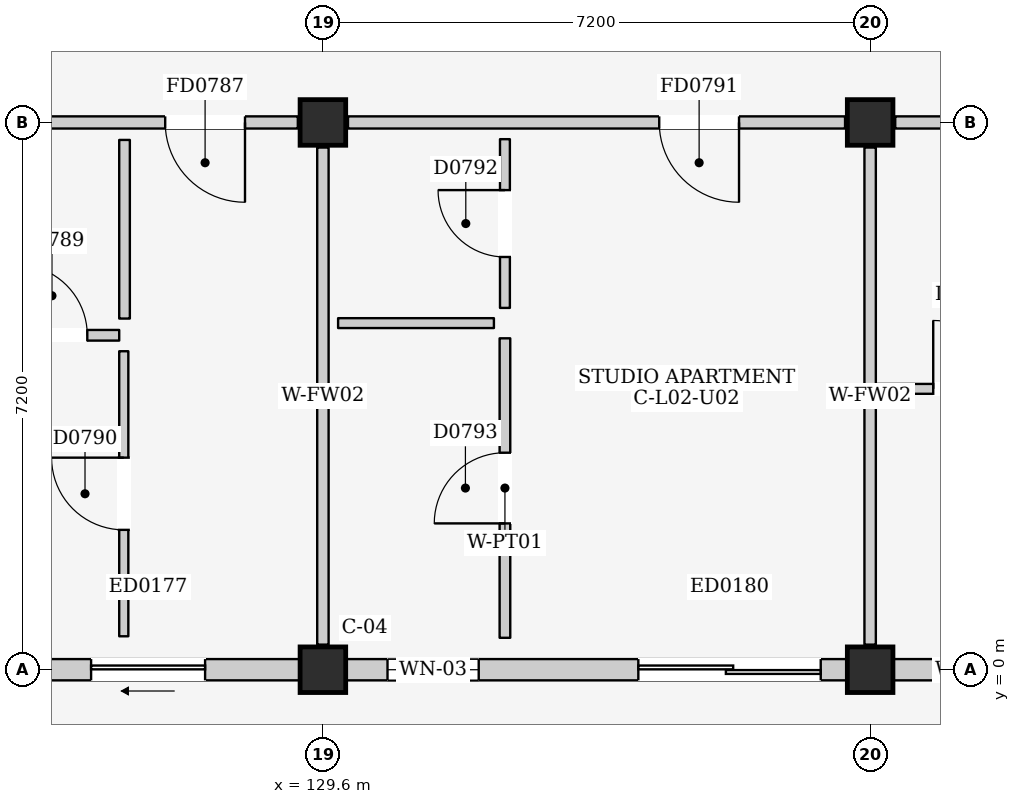
"""IFC4 building model, lengths in metres.
Left out: names, types, materials, properties, quantities, classifications, styles, units other than length and angle.
Written with IfcOpenShell. Run it as: python <this file> out.ifc"""

import sys

from ifc_helpers import new_model, si_unit, direction, frame, frame_2d, origin, origin_2d, place, context, subcontext, project, spatial, rectangle, extrude, element, fill, save


model = new_model("IFC4")
c1 = context("Model", 3, precision=1e-05, world=origin(), true_north=direction((0.0, 1.0)))
c2 = subcontext(c1, "Body", "Model", "MODEL_VIEW")
j1 = project(units=[si_unit("LENGTHUNIT", "METRE"), si_unit("PLANEANGLEUNIT", "RADIAN")], contexts=[c1])
p1 = place(None, origin())
s1 = spatial("IfcSite", under=j1, at=p1, CompositionType="ELEMENT")
p2 = place(p1, origin())
s2 = spatial("IfcBuilding", under=s1, at=p2, CompositionType="ELEMENT")
p3 = place(p2, frame((0.0, 0.0, 9.0)))
s3 = spatial("IfcBuildingStorey", under=s2, at=p3, CompositionType="ELEMENT", Elevation=9.0)
for number, where, z_axis, x_axis in (
    (1, (129.6, 0.0, 0.0), (0.0, 0.0, 1.0), (1.0, 0.0, 0.0)),
    (2, (129.6, 7.2, 0.0), (0.0, 0.0, 1.0), (1.0, 0.0, 0.0)),
    (3, (136.8, 0.0, 0.0), (0.0, 0.0, 1.0), (1.0, 0.0, 0.0)),
    (4, (136.8, 7.2, 0.0), (0.0, 0.0, 1.0), (1.0, 0.0, 0.0)),
):
    element("IfcColumn", number, at=place(p3, frame(where, z_axis=z_axis, x_axis=x_axis)), inside=s3, PredefinedType="COLUMN", context=c2, shape_type="SweptSolid", body=[
        extrude(rectangle(XDim=0.6, YDim=0.6, at=origin_2d()), origin(), (0.0, 0.0, 1.0), 3.2),
    ])
p4 = place(p3, frame((122.7, 0.0, 0.0), z_axis=(0.0, 0.0, 1.0), x_axis=(1.0, 0.0, 0.0)))
e5 = element("IfcWall", 5, at=p4, inside=s3, PredefinedType="ELEMENTEDWALL", context=c2, shape_type="SweptSolid", body=[
    extrude(rectangle(XDim=6.6, YDim=0.28, at=frame_2d((3.3, 0.0))), origin(), (0.0, 0.0, 1.0), 2.425),
])
p5 = place(p4, frame((3.85, 0.0, 0.0)))
e6 = element("IfcOpeningElement", 6, at=p5, cuts=e5, PredefinedType="OPENING", context=c2, shape_type="SweptSolid", body=[
    extrude(rectangle(XDim=1.5, YDim=2.12, at=frame_2d((0.75, 1.06))), frame((0.0, 0.155, 0.0), z_axis=(0.0, -1.0, 0.0), x_axis=(1.0, 0.0, 0.0)), (0.0, 0.0, 1.0), 0.31),
])
p6 = place(p4, frame((0.55, 0.0, 0.815)))
e7 = element("IfcOpeningElement", 7, at=p6, cuts=e5, PredefinedType="OPENING", context=c2, shape_type="SweptSolid", body=[
    extrude(rectangle(XDim=1.5, YDim=1.5, at=frame_2d((0.75, 0.75))), frame((0.0, 0.155, 0.0), z_axis=(0.0, -1.0, 0.0), x_axis=(1.0, 0.0, 0.0)), (0.0, 0.0, 1.0), 0.31),
])
p7 = place(p3, frame((129.9, 0.0, 0.0), z_axis=(0.0, 0.0, 1.0), x_axis=(1.0, 0.0, 0.0)))
e8 = element("IfcWall", 8, at=p7, inside=s3, PredefinedType="ELEMENTEDWALL", context=c2, shape_type="SweptSolid", body=[
    extrude(rectangle(XDim=6.6, YDim=0.28, at=frame_2d((3.3, 0.0))), origin(), (0.0, 0.0, 1.0), 2.425),
])
p8 = place(p7, frame((3.85, 0.0, 0.0)))
e9 = element("IfcOpeningElement", 9, at=p8, cuts=e8, PredefinedType="OPENING", context=c2, shape_type="SweptSolid", body=[
    extrude(rectangle(XDim=2.4, YDim=2.12, at=frame_2d((1.2, 1.06))), frame((0.0, 0.155, 0.0), z_axis=(0.0, -1.0, 0.0), x_axis=(1.0, 0.0, 0.0)), (0.0, 0.0, 1.0), 0.31),
])
p9 = place(p7, frame((0.55, 0.0, 0.9)))
e10 = element("IfcOpeningElement", 10, at=p9, cuts=e8, PredefinedType="OPENING", context=c2, shape_type="SweptSolid", body=[
    extrude(rectangle(XDim=1.2, YDim=1.35, at=frame_2d((0.6, 0.675))), frame((0.0, 0.155, 0.0), z_axis=(0.0, -1.0, 0.0), x_axis=(1.0, 0.0, 0.0)), (0.0, 0.0, 1.0), 0.31),
])
p10 = place(p3, frame((137.1, 0.0, 0.0), z_axis=(0.0, 0.0, 1.0), x_axis=(1.0, 0.0, 0.0)))
e11 = element("IfcWall", 11, at=p10, inside=s3, PredefinedType="ELEMENTEDWALL", context=c2, shape_type="SweptSolid", body=[
    extrude(rectangle(XDim=6.6, YDim=0.28, at=frame_2d((3.3, 0.0))), origin(), (0.0, 0.0, 1.0), 2.425),
])
p11 = place(p10, frame((3.85, 0.0, 0.0)))
e12 = element("IfcOpeningElement", 12, at=p11, cuts=e11, PredefinedType="OPENING", context=c2, shape_type="SweptSolid", body=[
    extrude(rectangle(XDim=2.0, YDim=2.12, at=frame_2d((1.0, 1.06))), frame((0.0, 0.155, 0.0), z_axis=(0.0, -1.0, 0.0), x_axis=(1.0, 0.0, 0.0)), (0.0, 0.0, 1.0), 0.31),
])
p12 = place(p10, frame((0.55, 0.0, 0.9)))
e13 = element("IfcOpeningElement", 13, at=p12, cuts=e11, PredefinedType="OPENING", context=c2, shape_type="SweptSolid", body=[
    extrude(rectangle(XDim=0.9, YDim=1.1, at=frame_2d((0.45, 0.55))), frame((0.0, 0.155, 0.0), z_axis=(0.0, -1.0, 0.0), x_axis=(1.0, 0.0, 0.0)), (0.0, 0.0, 1.0), 0.31),
])
p13 = place(p3, frame((122.73, 7.2, 0.0), z_axis=(0.0, 0.0, 1.0), x_axis=(1.0, 0.0, 0.0)))
e14 = element("IfcWall", 14, at=p13, inside=s3, PredefinedType="PARTITIONING", context=c2, shape_type="SweptSolid", body=[
    extrude(rectangle(XDim=6.54, YDim=0.16, at=frame_2d((3.27, 0.0))), origin(), (0.0, 0.0, 1.0), 2.345),
])
p14 = place(p13, frame((4.795, 0.0, 0.0)))
e15 = element("IfcOpeningElement", 15, at=p14, cuts=e14, PredefinedType="OPENING", context=c2, shape_type="SweptSolid", body=[
    extrude(rectangle(XDim=1.05, YDim=2.15, at=frame_2d((0.525, 1.075))), frame((0.0, 0.095, 0.0), z_axis=(0.0, -1.0, 0.0), x_axis=(1.0, 0.0, 0.0)), (0.0, 0.0, 1.0), 0.19),
])
p15 = place(p3, frame((129.6, 0.33, 0.0), z_axis=(0.0, 0.0, 1.0), x_axis=(0.0, 1.0, 0.0)))
e16 = element("IfcWall", 16, at=p15, inside=s3, PredefinedType="PARTITIONING", context=c2, shape_type="SweptSolid", body=[
    extrude(rectangle(XDim=6.54, YDim=0.15, at=frame_2d((3.27, 0.0))), origin(), (0.0, 0.0, 1.0), 2.395),
])
p16 = place(p3, frame((125.15, 4.4, 0.0), z_axis=(0.0, 0.0, 1.0), x_axis=(1.0, 0.0, 0.0)))
e17 = element("IfcWall", 17, at=p16, inside=s3, PredefinedType="PARTITIONING", context=c2, shape_type="SweptSolid", body=[
    extrude(rectangle(XDim=1.77, YDim=0.14, at=frame_2d((0.885, 0.0))), origin(), (0.0, 0.0, 1.0), 2.96),
])
p17 = place(p16, frame((0.42, 0.0, 0.0)))
e18 = element("IfcOpeningElement", 18, at=p17, cuts=e17, PredefinedType="OPENING", context=c2, shape_type="SweptSolid", body=[
    extrude(rectangle(XDim=0.93, YDim=2.14, at=frame_2d((0.465, 1.07))), frame((0.0, 0.085, 0.0), z_axis=(0.0, -1.0, 0.0), x_axis=(1.0, 0.0, 0.0)), (0.0, 0.0, 1.0), 0.17),
])
p18 = place(p3, frame((126.99, 4.62, 0.0), z_axis=(0.0, 0.0, 1.0), x_axis=(0.0, 1.0, 0.0)))
e19 = element("IfcWall", 19, at=p18, inside=s3, PredefinedType="PARTITIONING", context=c2, shape_type="SweptSolid", body=[
    extrude(rectangle(XDim=2.35, YDim=0.14, at=frame_2d((1.175, 0.0))), origin(), (0.0, 0.0, 1.0), 2.96),
])
p19 = place(p3, frame((126.98, 0.44, 0.0), z_axis=(0.0, 0.0, 1.0), x_axis=(0.0, 1.0, 0.0)))
e20 = element("IfcWall", 20, at=p19, inside=s3, PredefinedType="PARTITIONING", context=c2, shape_type="SweptSolid", body=[
    extrude(rectangle(XDim=3.75, YDim=0.12, at=frame_2d((1.875, 0.0))), origin(), (0.0, 0.0, 1.0), 2.96),
])
p20 = place(p19, frame((1.4, 0.0, 0.0)))
e21 = element("IfcOpeningElement", 21, at=p20, cuts=e20, PredefinedType="OPENING", context=c2, shape_type="SweptSolid", body=[
    extrude(rectangle(XDim=0.95, YDim=2.15, at=frame_2d((0.475, 1.075))), frame((0.0, 0.075, 0.0), z_axis=(0.0, -1.0, 0.0), x_axis=(1.0, 0.0, 0.0)), (0.0, 0.0, 1.0), 0.15),
])
p21 = place(p3, frame((129.93, 7.2, 0.0), z_axis=(0.0, 0.0, 1.0), x_axis=(1.0, 0.0, 0.0)))
e22 = element("IfcWall", 22, at=p21, inside=s3, PredefinedType="PARTITIONING", context=c2, shape_type="SweptSolid", body=[
    extrude(rectangle(XDim=6.54, YDim=0.16, at=frame_2d((3.27, 0.0))), origin(), (0.0, 0.0, 1.0), 2.345),
])
p22 = place(p21, frame((4.095, 0.0, 0.0)))
e23 = element("IfcOpeningElement", 23, at=p22, cuts=e22, PredefinedType="OPENING", context=c2, shape_type="SweptSolid", body=[
    extrude(rectangle(XDim=1.05, YDim=2.15, at=frame_2d((0.525, 1.075))), frame((0.0, 0.095, 0.0), z_axis=(0.0, -1.0, 0.0), x_axis=(1.0, 0.0, 0.0)), (0.0, 0.0, 1.0), 0.19),
])
p23 = place(p3, frame((136.8, 0.33, 0.0), z_axis=(0.0, 0.0, 1.0), x_axis=(0.0, 1.0, 0.0)))
e24 = element("IfcWall", 24, at=p23, inside=s3, PredefinedType="PARTITIONING", context=c2, shape_type="SweptSolid", body=[
    extrude(rectangle(XDim=6.54, YDim=0.15, at=frame_2d((3.27, 0.0))), origin(), (0.0, 0.0, 1.0), 2.395),
])
p24 = place(p3, frame((129.8, 4.56, 0.0), z_axis=(0.0, 0.0, 1.0), x_axis=(1.0, 0.0, 0.0)))
e25 = element("IfcWall", 25, at=p24, inside=s3, PredefinedType="PARTITIONING", context=c2, shape_type="SweptSolid", body=[
    extrude(rectangle(XDim=2.05, YDim=0.13, at=frame_2d((1.025, 0.0))), origin(), (0.0, 0.0, 1.0), 2.96),
])
p25 = place(p3, frame((131.995, 4.76, 0.0), z_axis=(0.0, 0.0, 1.0), x_axis=(0.0, 1.0, 0.0)))
e26 = element("IfcWall", 26, at=p25, inside=s3, PredefinedType="PARTITIONING", context=c2, shape_type="SweptSolid", body=[
    extrude(rectangle(XDim=2.22, YDim=0.13, at=frame_2d((1.11, 0.0))), origin(), (0.0, 0.0, 1.0), 2.96),
])
p26 = place(p25, frame((0.67, 0.0, 0.0)))
e27 = element("IfcOpeningElement", 27, at=p26, cuts=e26, PredefinedType="OPENING", context=c2, shape_type="SweptSolid", body=[
    extrude(rectangle(XDim=0.88, YDim=2.1, at=frame_2d((0.44, 1.05))), frame((0.0, 0.08, 0.0), z_axis=(0.0, -1.0, 0.0), x_axis=(1.0, 0.0, 0.0)), (0.0, 0.0, 1.0), 0.16),
])
p27 = place(p3, frame((131.995, 0.42, 0.0), z_axis=(0.0, 0.0, 1.0), x_axis=(0.0, 1.0, 0.0)))
e28 = element("IfcWall", 28, at=p27, inside=s3, PredefinedType="PARTITIONING", context=c2, shape_type="SweptSolid", body=[
    extrude(rectangle(XDim=3.94, YDim=0.14, at=frame_2d((1.97, 0.0))), origin(), (0.0, 0.0, 1.0), 2.96),
])
p28 = place(p27, frame((1.505, 0.0, 0.0)))
e29 = element("IfcOpeningElement", 29, at=p28, cuts=e28, PredefinedType="OPENING", context=c2, shape_type="SweptSolid", body=[
    extrude(rectangle(XDim=0.93, YDim=2.14, at=frame_2d((0.465, 1.07))), frame((0.0, 0.085, 0.0), z_axis=(0.0, -1.0, 0.0), x_axis=(1.0, 0.0, 0.0)), (0.0, 0.0, 1.0), 0.17),
])
p29 = place(p3, frame((137.13, 7.2, 0.0), z_axis=(0.0, 0.0, 1.0), x_axis=(1.0, 0.0, 0.0)))
e30 = element("IfcWall", 30, at=p29, inside=s3, PredefinedType="PARTITIONING", context=c2, shape_type="SweptSolid", body=[
    extrude(rectangle(XDim=6.54, YDim=0.16, at=frame_2d((3.27, 0.0))), origin(), (0.0, 0.0, 1.0), 2.345),
])
p30 = place(p29, frame((5.275, 0.0, 0.0)))
e31 = element("IfcOpeningElement", 31, at=p30, cuts=e30, PredefinedType="OPENING", context=c2, shape_type="SweptSolid", body=[
    extrude(rectangle(XDim=1.05, YDim=2.15, at=frame_2d((0.525, 1.075))), frame((0.0, 0.095, 0.0), z_axis=(0.0, -1.0, 0.0), x_axis=(1.0, 0.0, 0.0)), (0.0, 0.0, 1.0), 0.19),
])
p31 = place(p3, frame((136.88, 3.695, 0.0), z_axis=(0.0, 0.0, 1.0), x_axis=(1.0, 0.0, 0.0)))
e32 = element("IfcWall", 32, at=p31, inside=s3, PredefinedType="PARTITIONING", context=c2, shape_type="SweptSolid", body=[
    extrude(rectangle(XDim=2.4, YDim=0.13, at=frame_2d((1.2, 0.0))), origin(), (0.0, 0.0, 1.0), 2.96),
])
p32 = place(p31, frame((0.75, 0.0, 0.0)))
e33 = element("IfcOpeningElement", 33, at=p32, cuts=e32, PredefinedType="OPENING", context=c2, shape_type="SweptSolid", body=[
    extrude(rectangle(XDim=0.9, YDim=2.1, at=frame_2d((0.45, 1.05))), frame((0.0, 0.08, 0.0), z_axis=(0.0, -1.0, 0.0), x_axis=(1.0, 0.0, 0.0)), (0.0, 0.0, 1.0), 0.16),
])
p33 = place(p5, frame((1.5, 0.0, 0.0), z_axis=(0.0, 0.0, 1.0), x_axis=(-1.0, 0.0, 0.0)))
e34 = element("IfcDoor", 34, at=p33, inside=s3, OperationType="SLIDING_TO_LEFT", PredefinedType="DOOR", context=c2, shape_type="SweptSolid", body=[
    extrude(rectangle(XDim=1.5, YDim=2.12, at=frame_2d((0.75, 1.06))), frame((0.0, 0.025, 0.0), z_axis=(0.0, -1.0, 0.0), x_axis=(1.0, 0.0, 0.0)), (0.0, 0.0, 1.0), 0.05),
])
fill(e6, e34)
p34 = place(p8, frame((2.4, 0.0, 0.0), z_axis=(0.0, 0.0, 1.0), x_axis=(-1.0, 0.0, 0.0)))
e35 = element("IfcDoor", 35, at=p34, inside=s3, OperationType="DOUBLE_DOOR_SLIDING", PredefinedType="DOOR", context=c2, shape_type="SweptSolid", body=[
    extrude(rectangle(XDim=2.4, YDim=2.12, at=frame_2d((1.2, 1.06))), frame((0.0, 0.025, 0.0), z_axis=(0.0, -1.0, 0.0), x_axis=(1.0, 0.0, 0.0)), (0.0, 0.0, 1.0), 0.05),
])
fill(e9, e35)
p35 = place(p9, origin())
e36 = element("IfcWindow", 36, at=p35, inside=s3, PartitioningType="SINGLE_PANEL", PredefinedType="WINDOW", context=c2, shape_type="SweptSolid", body=[
    extrude(rectangle(XDim=1.2, YDim=1.35, at=frame_2d((0.6, 0.675))), frame((0.0, 0.03, 0.0), z_axis=(0.0, -1.0, 0.0), x_axis=(1.0, 0.0, 0.0)), (0.0, 0.0, 1.0), 0.06),
])
fill(e10, e36)
p36 = place(p12, origin())
e37 = element("IfcWindow", 37, at=p36, inside=s3, PartitioningType="SINGLE_PANEL", PredefinedType="WINDOW", context=c2, shape_type="SweptSolid", body=[
    extrude(rectangle(XDim=0.9, YDim=1.1, at=frame_2d((0.45, 0.55))), frame((0.0, 0.03, 0.0), z_axis=(0.0, -1.0, 0.0), x_axis=(1.0, 0.0, 0.0)), (0.0, 0.0, 1.0), 0.06),
])
fill(e13, e37)
p37 = place(p14, frame((1.05, 0.0, 0.0), z_axis=(0.0, 0.0, 1.0), x_axis=(-1.0, 0.0, 0.0)))
e38 = element("IfcDoor", 38, at=p37, inside=s3, OperationType="SINGLE_SWING_LEFT", PredefinedType="DOOR", context=c2, shape_type="SweptSolid", body=[
    extrude(rectangle(XDim=1.05, YDim=2.15, at=frame_2d((0.525, 1.075))), frame((0.0, 0.025, 0.0), z_axis=(0.0, -1.0, 0.0), x_axis=(1.0, 0.0, 0.0)), (0.0, 0.0, 1.0), 0.05),
])
fill(e15, e38)
p38 = place(p17, origin())
e39 = element("IfcDoor", 39, at=p38, inside=s3, OperationType="SINGLE_SWING_LEFT", PredefinedType="DOOR", context=c2, shape_type="SweptSolid", body=[
    extrude(rectangle(XDim=0.93, YDim=2.14, at=frame_2d((0.465, 1.07))), frame((0.0, 0.025, 0.0), z_axis=(0.0, -1.0, 0.0), x_axis=(1.0, 0.0, 0.0)), (0.0, 0.0, 1.0), 0.05),
])
fill(e18, e39)
p39 = place(p20, origin())
e40 = element("IfcDoor", 40, at=p39, inside=s3, OperationType="SINGLE_SWING_RIGHT", PredefinedType="DOOR", context=c2, shape_type="SweptSolid", body=[
    extrude(rectangle(XDim=0.95, YDim=2.15, at=frame_2d((0.475, 1.075))), frame((0.0, 0.025, 0.0), z_axis=(0.0, -1.0, 0.0), x_axis=(1.0, 0.0, 0.0)), (0.0, 0.0, 1.0), 0.05),
])
fill(e21, e40)
p40 = place(p22, frame((1.05, 0.0, 0.0), z_axis=(0.0, 0.0, 1.0), x_axis=(-1.0, 0.0, 0.0)))
e41 = element("IfcDoor", 41, at=p40, inside=s3, OperationType="SINGLE_SWING_LEFT", PredefinedType="DOOR", context=c2, shape_type="SweptSolid", body=[
    extrude(rectangle(XDim=1.05, YDim=2.15, at=frame_2d((0.525, 1.075))), frame((0.0, 0.025, 0.0), z_axis=(0.0, -1.0, 0.0), x_axis=(1.0, 0.0, 0.0)), (0.0, 0.0, 1.0), 0.05),
])
fill(e23, e41)
p41 = place(p26, origin())
e42 = element("IfcDoor", 42, at=p41, inside=s3, OperationType="SINGLE_SWING_RIGHT", PredefinedType="DOOR", context=c2, shape_type="SweptSolid", body=[
    extrude(rectangle(XDim=0.88, YDim=2.1, at=frame_2d((0.44, 1.05))), frame((0.0, 0.025, 0.0), z_axis=(0.0, -1.0, 0.0), x_axis=(1.0, 0.0, 0.0)), (0.0, 0.0, 1.0), 0.05),
])
fill(e27, e42)
p42 = place(p28, origin())
e43 = element("IfcDoor", 43, at=p42, inside=s3, OperationType="SINGLE_SWING_LEFT", PredefinedType="DOOR", context=c2, shape_type="SweptSolid", body=[
    extrude(rectangle(XDim=0.93, YDim=2.14, at=frame_2d((0.465, 1.07))), frame((0.0, 0.025, 0.0), z_axis=(0.0, -1.0, 0.0), x_axis=(1.0, 0.0, 0.0)), (0.0, 0.0, 1.0), 0.05),
])
fill(e29, e43)
p43 = place(p32, origin())
e44 = element("IfcDoor", 44, at=p43, inside=s3, OperationType="SINGLE_SWING_LEFT", PredefinedType="DOOR", context=c2, shape_type="SweptSolid", body=[
    extrude(rectangle(XDim=0.9, YDim=2.1, at=frame_2d((0.45, 1.05))), frame((0.0, 0.025, 0.0), z_axis=(0.0, -1.0, 0.0), x_axis=(1.0, 0.0, 0.0)), (0.0, 0.0, 1.0), 0.05),
])
fill(e33, e44)
save(model, sys.argv[1])
